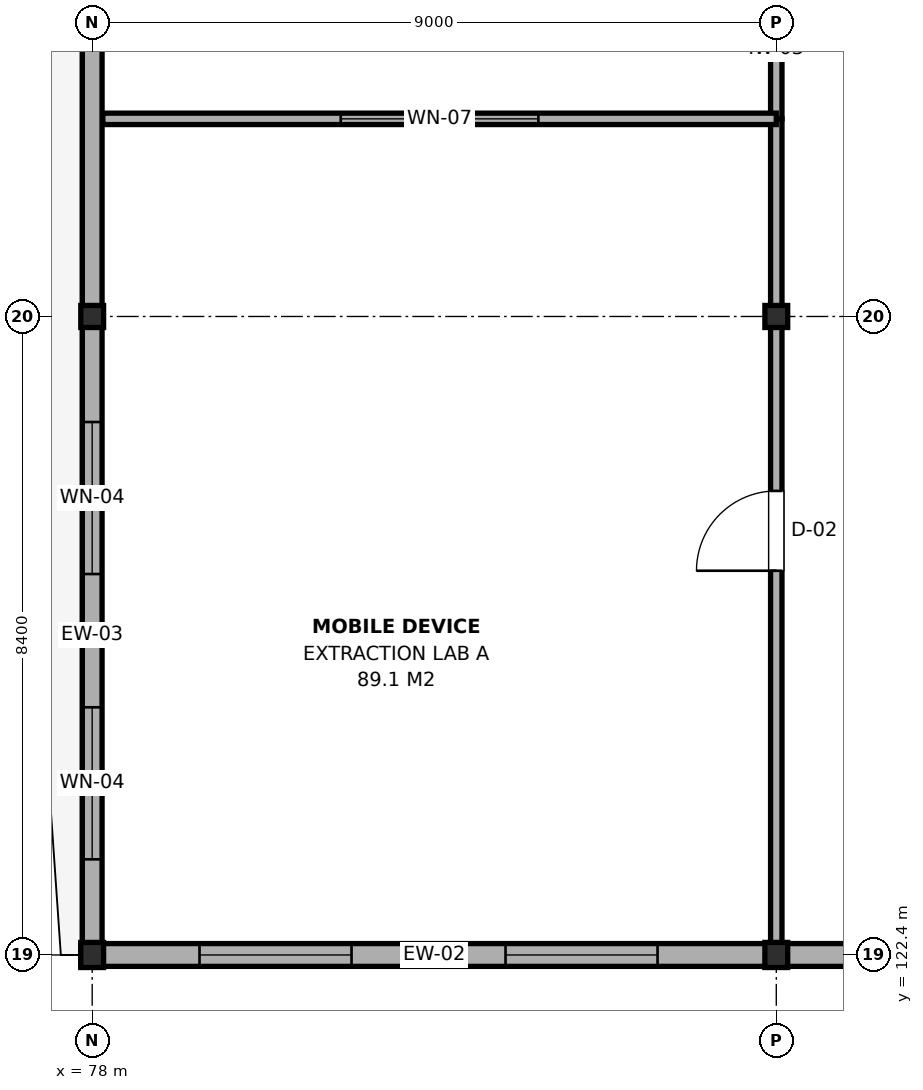
"""IFC4 building model, lengths in metres.
Left out: names, types, materials, properties, quantities, classifications, styles, units other than length and angle.
Written with IfcOpenShell. Run it as: python <this file> out.ifc"""

import sys

from ifc_helpers import new_model, si_unit, direction, frame, frame_2d, origin, origin_2d, place, context, subcontext, project, spatial, rectangle, i_section, extrude, element, fill, save


model = new_model("IFC4")
c1 = context("Model", 3, precision=1e-05, world=origin(), true_north=direction((0.0, 1.0)))
c2 = subcontext(c1, "Body", "Model", "MODEL_VIEW")
j1 = project(units=[si_unit("LENGTHUNIT", "METRE"), si_unit("PLANEANGLEUNIT", "RADIAN")], contexts=[c1])
p1 = place(None, origin())
s1 = spatial("IfcSite", under=j1, at=p1, CompositionType="ELEMENT")
p2 = place(p1, origin())
s2 = spatial("IfcBuilding", under=s1, at=p2, CompositionType="ELEMENT")
p3 = place(p2, frame((0.0, 0.0, 21.0)))
s3 = spatial("IfcBuildingStorey", under=s2, at=p3, CompositionType="ELEMENT", Elevation=21.0)
p4 = place(p3, frame((78.0, 122.4, 0.0), z_axis=(0.0, 0.0, 1.0), x_axis=(1.0, 0.0, 0.0)))
e1 = element("IfcColumn", 1, at=p4, inside=s3, PredefinedType="COLUMN", context=c2, shape_type="SweptSolid", body=[
    extrude(i_section(OverallWidth=0.3, OverallDepth=0.33, WebThickness=0.01, FlangeThickness=0.017, FilletRadius=0.027, at=origin_2d()), origin(), (0.0, 0.0, 1.0), 3.7),
])
p5 = place(p3, frame((78.0, 130.8, 0.0), z_axis=(0.0, 0.0, 1.0), x_axis=(1.0, 0.0, 0.0)))
e2 = element("IfcColumn", 2, at=p5, inside=s3, PredefinedType="COLUMN", context=c2, shape_type="SweptSolid", body=[
    extrude(i_section(OverallWidth=0.3, OverallDepth=0.29, WebThickness=0.009, FlangeThickness=0.014, FilletRadius=0.027, at=origin_2d()), origin(), (0.0, 0.0, 1.0), 3.7),
])
p6 = place(p3, frame((87.0, 122.4, 0.0), z_axis=(0.0, 0.0, 1.0), x_axis=(1.0, 0.0, 0.0)))
e3 = element("IfcColumn", 3, at=p6, inside=s3, PredefinedType="COLUMN", context=c2, shape_type="SweptSolid", body=[
    extrude(i_section(OverallWidth=0.3, OverallDepth=0.33, WebThickness=0.01, FlangeThickness=0.017, FilletRadius=0.027, at=origin_2d()), origin(), (0.0, 0.0, 1.0), 3.7),
])
p7 = place(p3, frame((87.0, 130.8, 0.0), z_axis=(0.0, 0.0, 1.0), x_axis=(1.0, 0.0, 0.0)))
e4 = element("IfcColumn", 4, at=p7, inside=s3, PredefinedType="COLUMN", context=c2, shape_type="SweptSolid", body=[
    extrude(i_section(OverallWidth=0.3, OverallDepth=0.29, WebThickness=0.009, FlangeThickness=0.014, FilletRadius=0.027, at=origin_2d()), origin(), (0.0, 0.0, 1.0), 3.7),
])
p8 = place(p3, frame((78.0, 122.27, 0.0), z_axis=(0.0, 0.0, 1.0), x_axis=(0.0, 1.0, 0.0)))
e5 = element("IfcWall", 5, at=p8, inside=s3, PredefinedType="SOLIDWALL", context=c2, shape_type="SweptSolid", body=[
    extrude(rectangle(XDim=8.53, YDim=0.26, at=frame_2d((4.265, 0.0))), origin(), (0.0, 0.0, 1.0), 3.195),
])
p9 = place(p8, frame((1.388, 0.0, 0.65)))
e6 = element("IfcOpeningElement", 6, at=p9, cuts=e5, PredefinedType="OPENING", context=c2, shape_type="SweptSolid", body=[
    extrude(rectangle(XDim=2.0, YDim=1.8, at=frame_2d((1.0, 0.9))), frame((0.0, 0.145, 0.0), z_axis=(0.0, -1.0, 0.0), x_axis=(1.0, 0.0, 0.0)), (0.0, 0.0, 1.0), 0.29),
])
p10 = place(p8, frame((5.142, 0.0, 0.65)))
e7 = element("IfcOpeningElement", 7, at=p10, cuts=e5, PredefinedType="OPENING", context=c2, shape_type="SweptSolid", body=[
    extrude(rectangle(XDim=2.0, YDim=1.8, at=frame_2d((1.0, 0.9))), frame((0.0, 0.145, 0.0), z_axis=(0.0, -1.0, 0.0), x_axis=(1.0, 0.0, 0.0)), (0.0, 0.0, 1.0), 0.29),
])
p11 = place(p3, frame((78.0, 130.8, 0.0), z_axis=(0.0, 0.0, 1.0), x_axis=(0.0, 1.0, 0.0)))
e8 = element("IfcWall", 8, at=p11, inside=s3, PredefinedType="SOLIDWALL", context=c2, shape_type="SweptSolid", body=[
    extrude(rectangle(XDim=7.2, YDim=0.26, at=frame_2d((3.6, 0.0))), origin(), (0.0, 0.0, 1.0), 3.195),
])
p12 = place(p11, frame((3.65, 0.0, 0.65)))
e9 = element("IfcOpeningElement", 9, at=p12, cuts=e8, PredefinedType="OPENING", context=c2, shape_type="SweptSolid", body=[
    extrude(rectangle(XDim=1.8, YDim=1.2, at=frame_2d((0.9, 0.6))), frame((0.0, 0.145, 0.0), z_axis=(0.0, -1.0, 0.0), x_axis=(1.0, 0.0, 0.0)), (0.0, 0.0, 1.0), 0.29),
])
p13 = place(p3, frame((77.85, 122.4, 0.0), z_axis=(0.0, 0.0, 1.0), x_axis=(1.0, 0.0, 0.0)))
e10 = element("IfcWall", 10, at=p13, inside=s3, PredefinedType="SOLIDWALL", context=c2, shape_type="SweptSolid", body=[
    extrude(rectangle(XDim=9.15, YDim=0.3, at=frame_2d((4.575, 0.0))), origin(), (0.0, 0.0, 1.0), 3.305),
])
p14 = place(p13, frame((1.562, 0.0, 0.65)))
e11 = element("IfcOpeningElement", 11, at=p14, cuts=e10, PredefinedType="OPENING", context=c2, shape_type="SweptSolid", body=[
    extrude(rectangle(XDim=2.0, YDim=1.8, at=frame_2d((1.0, 0.9))), frame((0.0, 0.165, 0.0), z_axis=(0.0, -1.0, 0.0), x_axis=(1.0, 0.0, 0.0)), (0.0, 0.0, 1.0), 0.33),
])
p15 = place(p13, frame((5.588, 0.0, 0.65)))
e12 = element("IfcOpeningElement", 12, at=p15, cuts=e10, PredefinedType="OPENING", context=c2, shape_type="SweptSolid", body=[
    extrude(rectangle(XDim=2.0, YDim=1.8, at=frame_2d((1.0, 0.9))), frame((0.0, 0.165, 0.0), z_axis=(0.0, -1.0, 0.0), x_axis=(1.0, 0.0, 0.0)), (0.0, 0.0, 1.0), 0.33),
])
p16 = place(p3, frame((87.0, 122.4, 0.0), z_axis=(0.0, 0.0, 1.0), x_axis=(1.0, 0.0, 0.0)))
e13 = element("IfcWall", 13, at=p16, inside=s3, PredefinedType="SOLIDWALL", context=c2, shape_type="SweptSolid", body=[
    extrude(rectangle(XDim=9.0, YDim=0.3, at=frame_2d((4.5, 0.0))), origin(), (0.0, 0.0, 1.0), 3.105),
])
p17 = place(p16, frame((2.97, 0.0, 0.65)))
e14 = element("IfcOpeningElement", 14, at=p17, cuts=e13, PredefinedType="OPENING", context=c2, shape_type="SweptSolid", body=[
    extrude(rectangle(XDim=2.0, YDim=1.8, at=frame_2d((1.0, 0.9))), frame((0.0, 0.165, 0.0), z_axis=(0.0, -1.0, 0.0), x_axis=(1.0, 0.0, 0.0)), (0.0, 0.0, 1.0), 0.33),
])
p18 = place(p16, frame((5.48, 0.0, 0.65)))
e15 = element("IfcOpeningElement", 15, at=p18, cuts=e13, PredefinedType="OPENING", context=c2, shape_type="SweptSolid", body=[
    extrude(rectangle(XDim=2.0, YDim=1.8, at=frame_2d((1.0, 0.9))), frame((0.0, 0.165, 0.0), z_axis=(0.0, -1.0, 0.0), x_axis=(1.0, 0.0, 0.0)), (0.0, 0.0, 1.0), 0.33),
])
p19 = place(p3, frame((87.0, 122.56, 0.0), z_axis=(0.0, 0.0, 1.0), x_axis=(0.0, 1.0, 0.0)))
e16 = element("IfcWall", 16, at=p19, inside=s3, PredefinedType="PARTITIONING", context=c2, shape_type="SweptSolid", body=[
    extrude(rectangle(XDim=10.84, YDim=0.15, at=frame_2d((5.42, 0.0))), origin(), (0.0, 0.0, 1.0), 3.105),
])
p20 = place(p19, frame((4.895, 0.0, 0.0)))
e17 = element("IfcOpeningElement", 17, at=p20, cuts=e16, PredefinedType="OPENING", context=c2, shape_type="SweptSolid", body=[
    extrude(rectangle(XDim=1.05, YDim=2.15, at=frame_2d((0.525, 1.075))), frame((0.0, 0.09, 0.0), z_axis=(0.0, -1.0, 0.0), x_axis=(1.0, 0.0, 0.0)), (0.0, 0.0, 1.0), 0.18),
])
p21 = place(p3, frame((87.0, 133.4, 0.0), z_axis=(0.0, 0.0, 1.0), x_axis=(0.0, 1.0, 0.0)))
e18 = element("IfcWall", 18, at=p21, inside=s3, PredefinedType="PARTITIONING", context=c2, shape_type="SweptSolid", body=[
    extrude(rectangle(XDim=10.8, YDim=0.15, at=frame_2d((5.4, 0.0))), origin(), (0.0, 0.0, 1.0), 3.195),
])
p22 = place(p21, frame((4.875, 0.0, 0.0)))
e19 = element("IfcOpeningElement", 19, at=p22, cuts=e18, PredefinedType="OPENING", context=c2, shape_type="SweptSolid", body=[
    extrude(rectangle(XDim=1.05, YDim=2.15, at=frame_2d((0.525, 1.075))), frame((0.0, 0.09, 0.0), z_axis=(0.0, -1.0, 0.0), x_axis=(1.0, 0.0, 0.0)), (0.0, 0.0, 1.0), 0.18),
])
p23 = place(p21, frame((6.476, 0.0, 0.95)))
e20 = element("IfcOpeningElement", 20, at=p23, cuts=e18, PredefinedType="OPENING", context=c2, shape_type="SweptSolid", body=[
    extrude(rectangle(XDim=2.6, YDim=1.5, at=frame_2d((1.3, 0.75))), frame((0.0, 0.09, 0.0), z_axis=(0.0, -1.0, 0.0), x_axis=(1.0, 0.0, 0.0)), (0.0, 0.0, 1.0), 0.18),
])
p24 = place(p3, frame((78.14, 133.4, 0.0), z_axis=(0.0, 0.0, 1.0), x_axis=(1.0, 0.0, 0.0)))
e21 = element("IfcWall", 21, at=p24, inside=s3, PredefinedType="PARTITIONING", context=c2, shape_type="SweptSolid", body=[
    extrude(rectangle(XDim=8.86, YDim=0.15, at=frame_2d((4.43, 0.0))), origin(), (0.0, 0.0, 1.0), 3.195),
])
p25 = place(p24, frame((3.13, 0.0, 0.95)))
e22 = element("IfcOpeningElement", 22, at=p25, cuts=e21, PredefinedType="OPENING", context=c2, shape_type="SweptSolid", body=[
    extrude(rectangle(XDim=2.6, YDim=1.5, at=frame_2d((1.3, 0.75))), frame((0.0, 0.09, 0.0), z_axis=(0.0, -1.0, 0.0), x_axis=(1.0, 0.0, 0.0)), (0.0, 0.0, 1.0), 0.18),
])
p26 = place(p9, origin())
e23 = element("IfcWindow", 23, at=p26, inside=s3, PartitioningType="SINGLE_PANEL", PredefinedType="WINDOW", context=c2, shape_type="SweptSolid", body=[
    extrude(rectangle(XDim=2.0, YDim=1.8, at=frame_2d((1.0, 0.9))), frame((0.0, 0.03, 0.0), z_axis=(0.0, -1.0, 0.0), x_axis=(1.0, 0.0, 0.0)), (0.0, 0.0, 1.0), 0.06),
])
fill(e6, e23)
p27 = place(p10, origin())
e24 = element("IfcWindow", 24, at=p27, inside=s3, PartitioningType="SINGLE_PANEL", PredefinedType="WINDOW", context=c2, shape_type="SweptSolid", body=[
    extrude(rectangle(XDim=2.0, YDim=1.8, at=frame_2d((1.0, 0.9))), frame((0.0, 0.03, 0.0), z_axis=(0.0, -1.0, 0.0), x_axis=(1.0, 0.0, 0.0)), (0.0, 0.0, 1.0), 0.06),
])
fill(e7, e24)
p28 = place(p14, origin())
e25 = element("IfcWindow", 25, at=p28, inside=s3, PartitioningType="SINGLE_PANEL", PredefinedType="WINDOW", context=c2, shape_type="SweptSolid", body=[
    extrude(rectangle(XDim=2.0, YDim=1.8, at=frame_2d((1.0, 0.9))), frame((0.0, 0.03, 0.0), z_axis=(0.0, -1.0, 0.0), x_axis=(1.0, 0.0, 0.0)), (0.0, 0.0, 1.0), 0.06),
])
fill(e11, e25)
p29 = place(p15, origin())
e26 = element("IfcWindow", 26, at=p29, inside=s3, PartitioningType="SINGLE_PANEL", PredefinedType="WINDOW", context=c2, shape_type="SweptSolid", body=[
    extrude(rectangle(XDim=2.0, YDim=1.8, at=frame_2d((1.0, 0.9))), frame((0.0, 0.03, 0.0), z_axis=(0.0, -1.0, 0.0), x_axis=(1.0, 0.0, 0.0)), (0.0, 0.0, 1.0), 0.06),
])
fill(e12, e26)
p30 = place(p20, origin())
e27 = element("IfcDoor", 27, at=p30, inside=s3, OperationType="SINGLE_SWING_LEFT", PredefinedType="DOOR", context=c2, shape_type="SweptSolid", body=[
    extrude(rectangle(XDim=1.05, YDim=2.15, at=frame_2d((0.525, 1.075))), frame((0.0, 0.025, 0.0), z_axis=(0.0, -1.0, 0.0), x_axis=(1.0, 0.0, 0.0)), (0.0, 0.0, 1.0), 0.05),
])
fill(e17, e27)
p31 = place(p25, origin())
e28 = element("IfcWindow", 28, at=p31, inside=s3, PartitioningType="SINGLE_PANEL", PredefinedType="WINDOW", context=c2, shape_type="SweptSolid", body=[
    extrude(rectangle(XDim=2.6, YDim=1.5, at=frame_2d((1.3, 0.75))), frame((0.0, 0.03, 0.0), z_axis=(0.0, -1.0, 0.0), x_axis=(1.0, 0.0, 0.0)), (0.0, 0.0, 1.0), 0.06),
])
fill(e22, e28)
save(model, sys.argv[1])
